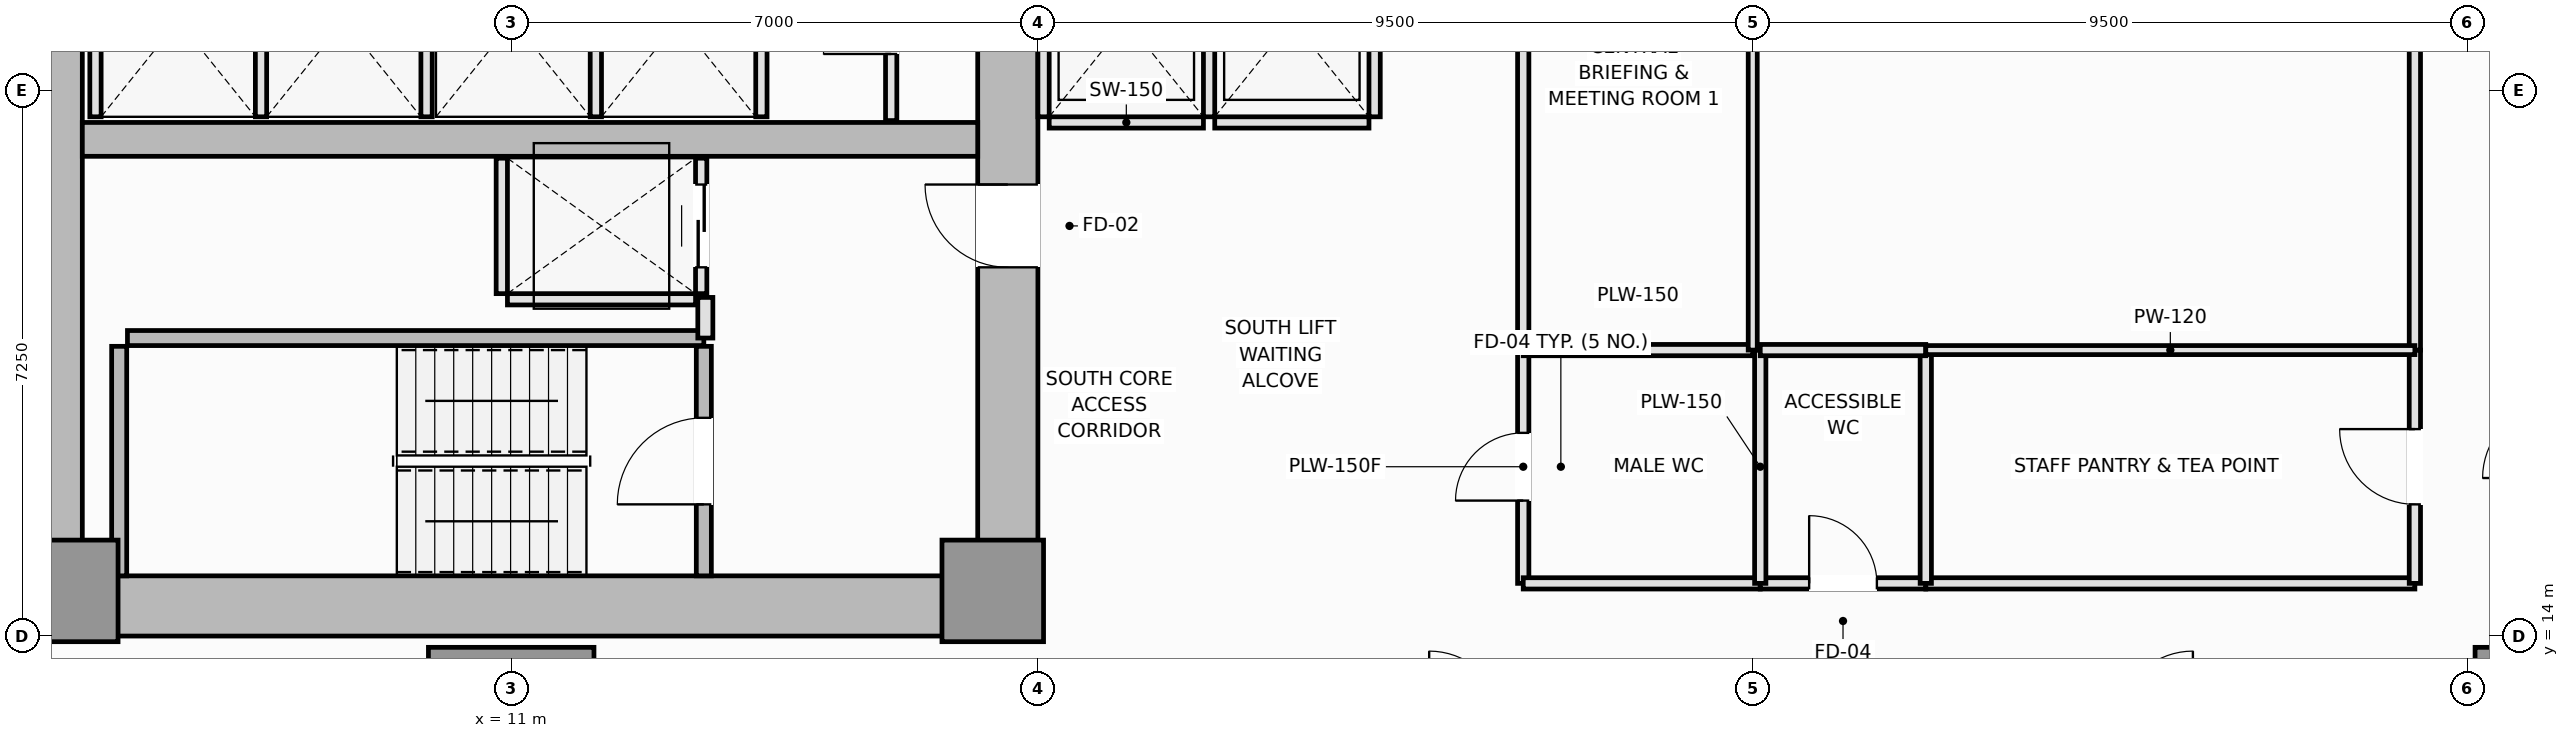
"""IFC4 building model, lengths in metres.
Left out: names, types, materials, properties, quantities, classifications, styles, units other than length and angle.
Written with IfcOpenShell. Run it as: python <this file> out.ifc"""

import sys

from ifc_helpers import new_model, si_unit, direction, frame, frame_2d, origin, origin_2d, place, context, subcontext, project, spatial, rectangle, extrude, element, fill, save


model = new_model("IFC4")
c1 = context("Model", 3, precision=1e-05, world=origin(), true_north=direction((0.0, 1.0)))
c2 = subcontext(c1, "Body", "Model", "MODEL_VIEW")
j1 = project(units=[si_unit("LENGTHUNIT", "METRE"), si_unit("PLANEANGLEUNIT", "RADIAN")], contexts=[c1])
p1 = place(None, origin())
s1 = spatial("IfcSite", under=j1, at=p1, CompositionType="ELEMENT")
p2 = place(p1, origin())
s2 = spatial("IfcBuilding", under=s1, at=p2, CompositionType="ELEMENT")
p3 = place(p2, frame((0.0, 0.0, 32.7)))
s3 = spatial("IfcBuildingStorey", under=s2, at=p3, CompositionType="ELEMENT", Elevation=32.7)
p4 = place(p3, frame((4.5, 14.4, 0.0), z_axis=(0.0, 0.0, 1.0), x_axis=(1.0, 0.0, 0.0)))
e1 = element("IfcWall", 1, at=p4, inside=s3, PredefinedType="SHEAR", context=c2, shape_type="SweptSolid", body=[
    extrude(rectangle(XDim=13.5, YDim=0.8, at=frame_2d((6.75, 0.0))), origin(), (0.0, 0.0, 1.0), 3.55),
])
p5 = place(p3, frame((4.9, 14.8, 0.0), z_axis=(0.0, 0.0, 1.0), x_axis=(0.0, 1.0, 0.0)))
e2 = element("IfcWall", 2, at=p5, inside=s3, PredefinedType="SHEAR", context=c2, shape_type="SweptSolid", body=[
    extrude(rectangle(XDim=20.9, YDim=0.8, at=frame_2d((10.45, 0.0))), origin(), (0.0, 0.0, 1.0), 3.55),
])
p6 = place(p3, frame((17.6, 14.8, 0.0), z_axis=(0.0, 0.0, 1.0), x_axis=(0.0, 1.0, 0.0)))
e3 = element("IfcWall", 3, at=p6, inside=s3, PredefinedType="SHEAR", context=c2, shape_type="SweptSolid", body=[
    extrude(rectangle(XDim=8.65, YDim=0.8, at=frame_2d((4.325, 0.0))), origin(), (0.0, 0.0, 1.0), 3.55),
])
p7 = place(p6, frame((4.1, 0.0, 0.0)))
e4 = element("IfcOpeningElement", 4, at=p7, cuts=e3, PredefinedType="OPENING", context=c2, shape_type="SweptSolid", body=[
    extrude(rectangle(XDim=1.1, YDim=2.15, at=frame_2d((0.55, 1.075))), frame((0.0, 0.41, 0.0), z_axis=(0.0, -1.0, 0.0), x_axis=(1.0, 0.0, 0.0)), (0.0, 0.0, 1.0), 0.82),
])
p8 = place(p3, frame((5.3, 20.6, 0.0), z_axis=(0.0, 0.0, 1.0), x_axis=(1.0, 0.0, 0.0)))
e5 = element("IfcWall", 5, at=p8, inside=s3, PredefinedType="SHEAR", context=c2, shape_type="SweptSolid", body=[
    extrude(rectangle(XDim=11.9, YDim=0.45, at=frame_2d((5.95, 0.0))), origin(), (0.0, 0.0, 1.0), 3.55),
])
for number, where, z_axis, x_axis in (
    (6, (5.1, 14.6, 0.0), (0.0, 0.0, 1.0), (1.0, 0.0, 0.0)),
    (7, (17.4, 14.6, 0.0), (0.0, 0.0, 1.0), (1.0, 0.0, 0.0)),
):
    element("IfcColumn", number, at=place(p3, frame(where, z_axis=z_axis, x_axis=x_axis)), inside=s3, PredefinedType="PILASTER", context=c2, shape_type="SweptSolid", body=[
        extrude(rectangle(XDim=1.35, YDim=1.35, at=origin_2d()), origin(), (0.0, 0.0, 1.0), 3.55),
    ])
for number, where, z_axis, x_axis in (
    (8, (11.0, 12.75, 0.0), (0.0, 0.0, 1.0), (1.0, 0.0, 0.0)),
    (9, (38.2, 12.75, 0.0), (0.0, 0.0, 1.0), (1.0, 0.0, 0.0)),
):
    element("IfcColumn", number, at=place(p3, frame(where, z_axis=z_axis, x_axis=x_axis)), inside=s3, PredefinedType="COLUMN", context=c2, shape_type="SweptSolid", body=[
        extrude(rectangle(XDim=2.2, YDim=2.2, at=origin_2d()), origin(), (0.0, 0.0, 1.0), 3.55),
    ])
p9 = place(p3, frame((5.79, 14.8, 0.0), z_axis=(0.0, 0.0, 1.0), x_axis=(0.0, 1.0, 0.0)))
e10 = element("IfcWall", 10, at=p9, inside=s3, PredefinedType="SOLIDWALL", context=c2, shape_type="SweptSolid", body=[
    extrude(rectangle(XDim=3.05, YDim=0.2, at=frame_2d((1.525, 0.0))), origin(), (0.0, 0.0, 1.0), 3.55),
])
p10 = place(p3, frame((5.9, 17.96, 0.0), z_axis=(0.0, 0.0, 1.0), x_axis=(1.0, 0.0, 0.0)))
e11 = element("IfcWall", 11, at=p10, inside=s3, PredefinedType="SOLIDWALL", context=c2, shape_type="SweptSolid", body=[
    extrude(rectangle(XDim=7.66, YDim=0.2, at=frame_2d((3.83, 0.0))), origin(), (0.0, 0.0, 1.0), 3.55),
])
p11 = place(p3, frame((13.56, 14.8, 0.0), z_axis=(0.0, 0.0, 1.0), x_axis=(0.0, 1.0, 0.0)))
e12 = element("IfcWall", 12, at=p11, inside=s3, PredefinedType="SOLIDWALL", context=c2, shape_type="SweptSolid", body=[
    extrude(rectangle(XDim=3.05, YDim=0.2, at=frame_2d((1.525, 0.0))), origin(), (0.0, 0.0, 1.0), 3.55),
])
p12 = place(p11, frame((0.95, 0.0, 0.0)))
e13 = element("IfcOpeningElement", 13, at=p12, cuts=e12, PredefinedType="OPENING", context=c2, shape_type="SweptSolid", body=[
    extrude(rectangle(XDim=1.15, YDim=2.15, at=frame_2d((0.575, 1.075))), frame((0.0, 0.11, 0.0), z_axis=(0.0, -1.0, 0.0), x_axis=(1.0, 0.0, 0.0)), (0.0, 0.0, 1.0), 0.22),
])
p13 = place(p3, frame((18.15, 20.825, 0.0), z_axis=(0.0, 0.0, 1.0), x_axis=(1.0, 0.0, 0.0)))
e14 = element("IfcWall", 14, at=p13, inside=s3, PredefinedType="PARTITIONING", context=c2, shape_type="SweptSolid", body=[
    extrude(rectangle(XDim=2.05, YDim=0.15, at=frame_2d((1.025, 0.0))), origin(), (0.0, 0.0, 1.0), 3.37),
])
for number, where, z_axis, x_axis in (
    (15, (18.075, 20.9, 0.0), (0.0, 0.0, 1.0), (0.0, 1.0, 0.0)),
    (16, (20.275, 20.9, 0.0), (0.0, 0.0, 1.0), (0.0, 1.0, 0.0)),
):
    element("IfcWall", number, at=place(p3, frame(where, z_axis=z_axis, x_axis=x_axis)), inside=s3, PredefinedType="PARTITIONING", context=c2, shape_type="SweptSolid", body=[
        extrude(rectangle(XDim=2.55, YDim=0.15, at=frame_2d((1.275, 0.0))), origin(), (0.0, 0.0, 1.0), 3.37),
    ])
p14 = place(p3, frame((20.35, 20.825, 0.0), z_axis=(0.0, 0.0, 1.0), x_axis=(1.0, 0.0, 0.0)))
e17 = element("IfcWall", 17, at=p14, inside=s3, PredefinedType="PARTITIONING", context=c2, shape_type="SweptSolid", body=[
    extrude(rectangle(XDim=2.05, YDim=0.15, at=frame_2d((1.025, 0.0))), origin(), (0.0, 0.0, 1.0), 3.37),
])
for number, where, z_axis, x_axis in (
    (18, (22.475, 20.9, 0.0), (0.0, 0.0, 1.0), (0.0, 1.0, 0.0)),
    (19, (5.475, 20.9, 0.0), (0.0, 0.0, 1.0), (0.0, 1.0, 0.0)),
    (20, (7.675, 20.9, 0.0), (0.0, 0.0, 1.0), (0.0, 1.0, 0.0)),
    (21, (9.875, 20.9, 0.0), (0.0, 0.0, 1.0), (0.0, 1.0, 0.0)),
    (22, (12.125, 20.9, 0.0), (0.0, 0.0, 1.0), (0.0, 1.0, 0.0)),
    (23, (14.325, 20.9, 0.0), (0.0, 0.0, 1.0), (0.0, 1.0, 0.0)),
):
    element("IfcWall", number, at=place(p3, frame(where, z_axis=z_axis, x_axis=x_axis)), inside=s3, PredefinedType="PARTITIONING", context=c2, shape_type="SweptSolid", body=[
        extrude(rectangle(XDim=2.55, YDim=0.15, at=frame_2d((1.275, 0.0))), origin(), (0.0, 0.0, 1.0), 3.37),
    ])
p15 = place(p3, frame((10.95, 18.475, 0.0), z_axis=(0.0, 0.0, 1.0), x_axis=(1.0, 0.0, 0.0)))
e24 = element("IfcWall", 24, at=p15, inside=s3, PredefinedType="PARTITIONING", context=c2, shape_type="SweptSolid", body=[
    extrude(rectangle(XDim=2.5, YDim=0.15, at=frame_2d((1.25, 0.0))), origin(), (0.0, 0.0, 1.0), 3.37),
])
p16 = place(p3, frame((10.875, 18.55, 0.0), z_axis=(0.0, 0.0, 1.0), x_axis=(0.0, 1.0, 0.0)))
e25 = element("IfcWall", 25, at=p16, inside=s3, PredefinedType="PARTITIONING", context=c2, shape_type="SweptSolid", body=[
    extrude(rectangle(XDim=1.8, YDim=0.15, at=frame_2d((0.9, 0.0))), origin(), (0.0, 0.0, 1.0), 3.37),
])
p17 = place(p3, frame((13.525, 18.55, 0.0), z_axis=(0.0, 0.0, 1.0), x_axis=(0.0, 1.0, 0.0)))
e26 = element("IfcWall", 26, at=p17, inside=s3, PredefinedType="PARTITIONING", context=c2, shape_type="SweptSolid", body=[
    extrude(rectangle(XDim=1.8, YDim=0.15, at=frame_2d((0.9, 0.0))), origin(), (0.0, 0.0, 1.0), 3.37),
])
p18 = place(p17, frame((0.35, 0.0, 0.0)))
e27 = element("IfcOpeningElement", 27, at=p18, cuts=e26, PredefinedType="OPENING", context=c2, shape_type="SweptSolid", body=[
    extrude(rectangle(XDim=1.1, YDim=2.2, at=frame_2d((0.55, 1.1))), frame((0.0, 0.085, 0.0), z_axis=(0.0, -1.0, 0.0), x_axis=(1.0, 0.0, 0.0)), (0.0, 0.0, 1.0), 0.17),
])
p19 = place(p3, frame((13.58, 17.96, 0.0), z_axis=(0.0, 0.0, 1.0), x_axis=(0.0, 1.0, 0.0)))
e28 = element("IfcWall", 28, at=p19, inside=s3, PredefinedType="PARTITIONING", context=c2, shape_type="SweptSolid", body=[
    extrude(rectangle(XDim=0.54, YDim=0.2, at=frame_2d((0.27, 0.0))), origin(), (0.0, 0.0, 1.0), 3.37),
])
p20 = place(p3, frame((16.05, 20.85, 0.0), z_axis=(0.0, 0.0, 1.0), x_axis=(0.0, 1.0, 0.0)))
e29 = element("IfcWall", 29, at=p20, inside=s3, PredefinedType="PARTITIONING", context=c2, shape_type="SweptSolid", body=[
    extrude(rectangle(XDim=2.67, YDim=0.15, at=frame_2d((1.335, 0.0))), origin(), (0.0, 0.0, 1.0), 3.37),
])
p21 = place(p20, frame((0.885, 0.0, 0.0)))
e30 = element("IfcOpeningElement", 30, at=p21, cuts=e29, PredefinedType="OPENING", context=c2, shape_type="SweptSolid", body=[
    extrude(rectangle(XDim=0.9, YDim=2.1, at=frame_2d((0.45, 1.05))), frame((0.0, 0.085, 0.0), z_axis=(0.0, -1.0, 0.0), x_axis=(1.0, 0.0, 0.0)), (0.0, 0.0, 1.0), 0.17),
])
p22 = place(p3, frame((24.45, 14.7, 0.0), z_axis=(0.0, 0.0, 1.0), x_axis=(0.0, 1.0, 0.0)))
e31 = element("IfcWall", 31, at=p22, inside=s3, PredefinedType="PLUMBINGWALL", context=c2, shape_type="SweptSolid", body=[
    extrude(rectangle(XDim=3.1, YDim=0.15, at=frame_2d((1.55, 0.0))), origin(), (0.0, 0.0, 1.0), 3.37),
])
p23 = place(p22, frame((1.1, 0.0, 0.0)))
e32 = element("IfcOpeningElement", 32, at=p23, cuts=e31, PredefinedType="OPENING", context=c2, shape_type="SweptSolid", body=[
    extrude(rectangle(XDim=0.9, YDim=2.1, at=frame_2d((0.45, 1.05))), frame((0.0, 0.085, 0.0), z_axis=(0.0, -1.0, 0.0), x_axis=(1.0, 0.0, 0.0)), (0.0, 0.0, 1.0), 0.17),
])
p24 = place(p3, frame((24.45, 17.8, 0.0), z_axis=(0.0, 0.0, 1.0), x_axis=(0.0, 1.0, 0.0)))
e33 = element("IfcWall", 33, at=p24, inside=s3, PredefinedType="PARTITIONING", context=c2, shape_type="SweptSolid", body=[
    extrude(rectangle(XDim=14.9, YDim=0.15, at=frame_2d((7.45, 0.0))), origin(), (0.0, 0.0, 1.0), 3.37),
])
p25 = place(p24, frame((6.95, 0.0, 0.0)))
e34 = element("IfcOpeningElement", 34, at=p25, cuts=e33, PredefinedType="OPENING", context=c2, shape_type="SweptSolid", body=[
    extrude(rectangle(XDim=1.0, YDim=2.15, at=frame_2d((0.5, 1.075))), frame((0.0, 0.085, 0.0), z_axis=(0.0, -1.0, 0.0), x_axis=(1.0, 0.0, 0.0)), (0.0, 0.0, 1.0), 0.17),
])
p26 = place(p3, frame((24.45, 14.7, 0.0), z_axis=(0.0, 0.0, 1.0), x_axis=(1.0, 0.0, 0.0)))
e35 = element("IfcWall", 35, at=p26, inside=s3, PredefinedType="PLUMBINGWALL", context=c2, shape_type="SweptSolid", body=[
    extrude(rectangle(XDim=3.15, YDim=0.15, at=frame_2d((1.575, 0.0))), origin(), (0.0, 0.0, 1.0), 3.37),
])
p27 = place(p3, frame((27.6, 14.7, 0.0), z_axis=(0.0, 0.0, 1.0), x_axis=(1.0, 0.0, 0.0)))
e36 = element("IfcWall", 36, at=p27, inside=s3, PredefinedType="PLUMBINGWALL", context=c2, shape_type="SweptSolid", body=[
    extrude(rectangle(XDim=2.2, YDim=0.15, at=frame_2d((1.1, 0.0))), origin(), (0.0, 0.0, 1.0), 3.37),
])
p28 = place(p27, frame((0.65, 0.0, 0.0)))
e37 = element("IfcOpeningElement", 37, at=p28, cuts=e36, PredefinedType="OPENING", context=c2, shape_type="SweptSolid", body=[
    extrude(rectangle(XDim=0.9, YDim=2.1, at=frame_2d((0.45, 1.05))), frame((0.0, 0.085, 0.0), z_axis=(0.0, -1.0, 0.0), x_axis=(1.0, 0.0, 0.0)), (0.0, 0.0, 1.0), 0.17),
])
p29 = place(p3, frame((29.8, 14.7, 0.0), z_axis=(0.0, 0.0, 1.0), x_axis=(1.0, 0.0, 0.0)))
e38 = element("IfcWall", 38, at=p29, inside=s3, PredefinedType="PARTITIONING", context=c2, shape_type="SweptSolid", body=[
    extrude(rectangle(XDim=6.5, YDim=0.15, at=frame_2d((3.25, 0.0))), origin(), (0.0, 0.0, 1.0), 3.37),
])
p30 = place(p3, frame((36.3, 14.7, 0.0), z_axis=(0.0, 0.0, 1.0), x_axis=(0.0, 1.0, 0.0)))
e39 = element("IfcWall", 39, at=p30, inside=s3, PredefinedType="PARTITIONING", context=c2, shape_type="SweptSolid", body=[
    extrude(rectangle(XDim=3.1, YDim=0.15, at=frame_2d((1.55, 0.0))), origin(), (0.0, 0.0, 1.0), 3.37),
])
p31 = place(p30, frame((1.05, 0.0, 0.0)))
e40 = element("IfcOpeningElement", 40, at=p31, cuts=e39, PredefinedType="OPENING", context=c2, shape_type="SweptSolid", body=[
    extrude(rectangle(XDim=1.0, YDim=2.15, at=frame_2d((0.5, 1.075))), frame((0.0, 0.085, 0.0), z_axis=(0.0, -1.0, 0.0), x_axis=(1.0, 0.0, 0.0)), (0.0, 0.0, 1.0), 0.17),
])
p32 = place(p3, frame((36.3, 17.8, 0.0), z_axis=(0.0, 0.0, 1.0), x_axis=(0.0, 1.0, 0.0)))
e41 = element("IfcWall", 41, at=p32, inside=s3, PredefinedType="PARTITIONING", context=c2, shape_type="SweptSolid", body=[
    extrude(rectangle(XDim=14.9, YDim=0.15, at=frame_2d((7.45, 0.0))), origin(), (0.0, 0.0, 1.0), 3.37),
])
p33 = place(p32, frame((8.364, 0.0, 0.0)))
e42 = element("IfcOpeningElement", 42, at=p33, cuts=e41, PredefinedType="OPENING", context=c2, shape_type="SweptSolid", body=[
    extrude(rectangle(XDim=1.0, YDim=2.15, at=frame_2d((0.5, 1.075))), frame((0.0, 0.085, 0.0), z_axis=(0.0, -1.0, 0.0), x_axis=(1.0, 0.0, 0.0)), (0.0, 0.0, 1.0), 0.17),
])
p34 = place(p3, frame((27.6, 14.7, 0.0), z_axis=(0.0, 0.0, 1.0), x_axis=(0.0, 1.0, 0.0)))
e43 = element("IfcWall", 43, at=p34, inside=s3, PredefinedType="PLUMBINGWALL", context=c2, shape_type="SweptSolid", body=[
    extrude(rectangle(XDim=3.1, YDim=0.15, at=frame_2d((1.55, 0.0))), origin(), (0.0, 0.0, 1.0), 3.37),
])
p35 = place(p3, frame((24.45, 17.8, 0.0), z_axis=(0.0, 0.0, 1.0), x_axis=(1.0, 0.0, 0.0)))
e44 = element("IfcWall", 44, at=p35, inside=s3, PredefinedType="PLUMBINGWALL", context=c2, shape_type="SweptSolid", body=[
    extrude(rectangle(XDim=3.05, YDim=0.15, at=frame_2d((1.525, 0.0))), origin(), (0.0, 0.0, 1.0), 3.37),
])
p36 = place(p3, frame((29.8, 14.7, 0.0), z_axis=(0.0, 0.0, 1.0), x_axis=(0.0, 1.0, 0.0)))
e45 = element("IfcWall", 45, at=p36, inside=s3, PredefinedType="PLUMBINGWALL", context=c2, shape_type="SweptSolid", body=[
    extrude(rectangle(XDim=3.1, YDim=0.15, at=frame_2d((1.55, 0.0))), origin(), (0.0, 0.0, 1.0), 3.37),
])
p37 = place(p3, frame((27.6, 17.8, 0.0), z_axis=(0.0, 0.0, 1.0), x_axis=(1.0, 0.0, 0.0)))
e46 = element("IfcWall", 46, at=p37, inside=s3, PredefinedType="PLUMBINGWALL", context=c2, shape_type="SweptSolid", body=[
    extrude(rectangle(XDim=2.2, YDim=0.15, at=frame_2d((1.1, 0.0))), origin(), (0.0, 0.0, 1.0), 3.37),
])
p38 = place(p3, frame((29.8, 17.8, 0.0), z_axis=(0.0, 0.0, 1.0), x_axis=(1.0, 0.0, 0.0)))
e47 = element("IfcWall", 47, at=p38, inside=s3, PredefinedType="PARTITIONING", context=c2, shape_type="SweptSolid", body=[
    extrude(rectangle(XDim=6.5, YDim=0.12, at=frame_2d((3.25, 0.0))), origin(), (0.0, 0.0, 1.0), 3.37),
])
p39 = place(p3, frame((27.5, 17.8, 0.0), z_axis=(0.0, 0.0, 1.0), x_axis=(0.0, 1.0, 0.0)))
e48 = element("IfcWall", 48, at=p39, inside=s3, PredefinedType="PARTITIONING", context=c2, shape_type="SweptSolid", body=[
    extrude(rectangle(XDim=14.9, YDim=0.12, at=frame_2d((7.45, 0.0))), origin(), (0.0, 0.0, 1.0), 3.37),
])
p40 = place(p12, origin())
e49 = element("IfcDoor", 49, at=p40, inside=s3, OperationType="SINGLE_SWING_LEFT", PredefinedType="DOOR", context=c2, shape_type="SweptSolid", body=[
    extrude(rectangle(XDim=1.15, YDim=2.15, at=frame_2d((0.575, 1.075))), frame((0.0, 0.025, 0.0), z_axis=(0.0, -1.0, 0.0), x_axis=(1.0, 0.0, 0.0)), (0.0, 0.0, 1.0), 0.05),
])
fill(e13, e49)
p41 = place(p18, origin())
e50 = element("IfcDoor", 50, at=p41, inside=s3, OperationType="DOUBLE_DOOR_SLIDING", PredefinedType="DOOR", context=c2, shape_type="SweptSolid", body=[
    extrude(rectangle(XDim=1.1, YDim=2.2, at=frame_2d((0.55, 1.1))), frame((0.0, 0.025, 0.0), z_axis=(0.0, -1.0, 0.0), x_axis=(1.0, 0.0, 0.0)), (0.0, 0.0, 1.0), 0.05),
])
fill(e27, e50)
p42 = place(p7, origin())
e51 = element("IfcDoor", 51, at=p42, inside=s3, OperationType="SINGLE_SWING_RIGHT", PredefinedType="DOOR", context=c2, shape_type="SweptSolid", body=[
    extrude(rectangle(XDim=1.1, YDim=2.15, at=frame_2d((0.55, 1.075))), frame((0.0, 0.025, 0.0), z_axis=(0.0, -1.0, 0.0), x_axis=(1.0, 0.0, 0.0)), (0.0, 0.0, 1.0), 0.05),
])
fill(e4, e51)
p43 = place(p21, origin())
e52 = element("IfcDoor", 52, at=p43, inside=s3, OperationType="SINGLE_SWING_LEFT", PredefinedType="DOOR", context=c2, shape_type="SweptSolid", body=[
    extrude(rectangle(XDim=0.9, YDim=2.1, at=frame_2d((0.45, 1.05))), frame((0.0, 0.025, 0.0), z_axis=(0.0, -1.0, 0.0), x_axis=(1.0, 0.0, 0.0)), (0.0, 0.0, 1.0), 0.05),
])
fill(e30, e52)
p44 = place(p23, origin())
e53 = element("IfcDoor", 53, at=p44, inside=s3, OperationType="SINGLE_SWING_LEFT", PredefinedType="DOOR", context=c2, shape_type="SweptSolid", body=[
    extrude(rectangle(XDim=0.9, YDim=2.1, at=frame_2d((0.45, 1.05))), frame((0.0, 0.025, 0.0), z_axis=(0.0, -1.0, 0.0), x_axis=(1.0, 0.0, 0.0)), (0.0, 0.0, 1.0), 0.05),
])
fill(e32, e53)
p45 = place(p28, origin())
e54 = element("IfcDoor", 54, at=p45, inside=s3, OperationType="SINGLE_SWING_LEFT", PredefinedType="DOOR", context=c2, shape_type="SweptSolid", body=[
    extrude(rectangle(XDim=0.9, YDim=2.1, at=frame_2d((0.45, 1.05))), frame((0.0, 0.025, 0.0), z_axis=(0.0, -1.0, 0.0), x_axis=(1.0, 0.0, 0.0)), (0.0, 0.0, 1.0), 0.05),
])
fill(e37, e54)
p46 = place(p31, origin())
e55 = element("IfcDoor", 55, at=p46, inside=s3, OperationType="SINGLE_SWING_RIGHT", PredefinedType="DOOR", context=c2, shape_type="SweptSolid", body=[
    extrude(rectangle(XDim=1.0, YDim=2.15, at=frame_2d((0.5, 1.075))), frame((0.0, 0.025, 0.0), z_axis=(0.0, -1.0, 0.0), x_axis=(1.0, 0.0, 0.0)), (0.0, 0.0, 1.0), 0.05),
])
fill(e40, e55)
save(model, sys.argv[1])
